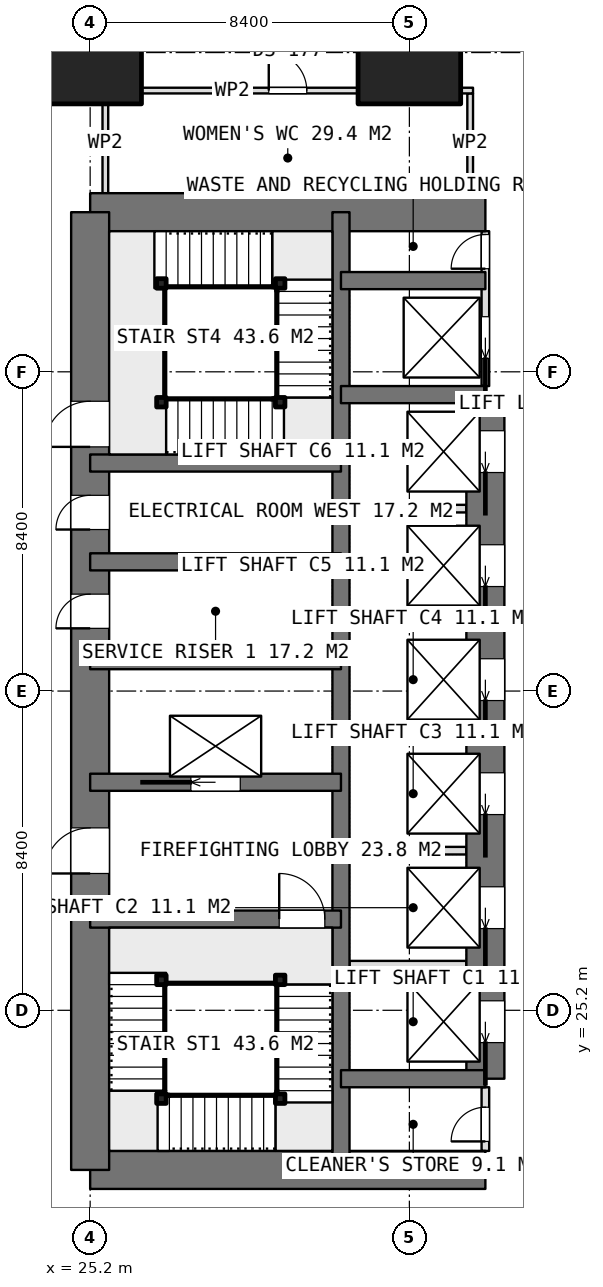
"""IFC4 building model, lengths in metres.
Left out: names, types, materials, properties, quantities, classifications, styles, units other than length and angle.
Written with IfcOpenShell. Run it as: python <this file> out.ifc"""

import sys

from ifc_helpers import new_model, si_unit, direction, frame, frame_2d, origin, origin_2d, place, context, subcontext, project, spatial, rectangle, extrude, element, fill, save


model = new_model("IFC4")
c1 = context("Model", 3, precision=1e-05, world=origin(), true_north=direction((0.0, 1.0)))
c2 = subcontext(c1, "Body", "Model", "MODEL_VIEW")
j1 = project(units=[si_unit("LENGTHUNIT", "METRE"), si_unit("PLANEANGLEUNIT", "RADIAN")], contexts=[c1])
p1 = place(None, origin())
s1 = spatial("IfcSite", under=j1, at=p1, CompositionType="ELEMENT")
p2 = place(p1, origin())
s2 = spatial("IfcBuilding", under=s1, at=p2, CompositionType="ELEMENT")
p3 = place(p2, frame((0.0, 0.0, 168.2)))
s3 = spatial("IfcBuildingStorey", under=s2, at=p3, CompositionType="ELEMENT", Elevation=168.2)
for number, where, z_axis, x_axis in (
    (1, (25.2, 21.0, 0.0), (0.0, 0.0, 1.0), (1.0, 0.0, 0.0)),
    (2, (25.2, 46.2, 0.0), (0.0, 0.0, 1.0), (1.0, 0.0, 0.0)),
):
    element("IfcWall", number, at=place(p3, frame(where, z_axis=z_axis, x_axis=x_axis)), inside=s3, PredefinedType="SHEAR", context=c2, shape_type="SweptSolid", body=[
        extrude(rectangle(XDim=10.4, YDim=1.0, at=frame_2d((5.2, 0.0))), origin(), (0.0, 0.0, 1.0), 4.5),
    ])
p4 = place(p3, frame((25.2, 21.0, 0.0), z_axis=(0.0, 0.0, 1.0), x_axis=(0.0, 1.0, 0.0)))
e3 = element("IfcWall", 3, at=p4, inside=s3, PredefinedType="SHEAR", context=c2, shape_type="SweptSolid", body=[
    extrude(rectangle(XDim=25.2, YDim=1.0, at=frame_2d((12.6, 0.0))), origin(), (0.0, 0.0, 1.0), 4.5),
])
p5 = place(p4, frame((7.8, 0.0, 0.0)))
e4 = element("IfcOpeningElement", 4, at=p5, cuts=e3, PredefinedType="OPENING", context=c2, shape_type="SweptSolid", body=[
    extrude(rectangle(XDim=1.2, YDim=2.1, at=frame_2d((0.6, 1.05))), frame((0.0, 0.51, 0.0), z_axis=(0.0, -1.0, 0.0), x_axis=(1.0, 0.0, 0.0)), (0.0, 0.0, 1.0), 1.02),
])
p6 = place(p4, frame((14.25, 0.0, 0.0)))
e5 = element("IfcOpeningElement", 5, at=p6, cuts=e3, PredefinedType="OPENING", context=c2, shape_type="SweptSolid", body=[
    extrude(rectangle(XDim=0.9, YDim=2.1, at=frame_2d((0.45, 1.05))), frame((0.0, 0.51, 0.0), z_axis=(0.0, -1.0, 0.0), x_axis=(1.0, 0.0, 0.0)), (0.0, 0.0, 1.0), 1.02),
])
p7 = place(p4, frame((16.85, 0.0, 0.0)))
e6 = element("IfcOpeningElement", 6, at=p7, cuts=e3, PredefinedType="OPENING", context=c2, shape_type="SweptSolid", body=[
    extrude(rectangle(XDim=0.9, YDim=2.1, at=frame_2d((0.45, 1.05))), frame((0.0, 0.51, 0.0), z_axis=(0.0, -1.0, 0.0), x_axis=(1.0, 0.0, 0.0)), (0.0, 0.0, 1.0), 1.02),
])
p8 = place(p4, frame((19.025, 0.0, 0.0)))
e7 = element("IfcOpeningElement", 7, at=p8, cuts=e3, PredefinedType="OPENING", context=c2, shape_type="SweptSolid", body=[
    extrude(rectangle(XDim=1.2, YDim=2.1, at=frame_2d((0.6, 1.05))), frame((0.0, 0.51, 0.0), z_axis=(0.0, -1.0, 0.0), x_axis=(1.0, 0.0, 0.0)), (0.0, 0.0, 1.0), 1.02),
])
p9 = place(p3, frame((31.8, 21.0, 0.0), z_axis=(0.0, 0.0, 1.0), x_axis=(0.0, 1.0, 0.0)))
e8 = element("IfcWall", 8, at=p9, inside=s3, PredefinedType="SHEAR", context=c2, shape_type="SweptSolid", body=[
    extrude(rectangle(XDim=25.2, YDim=0.45, at=frame_2d((12.6, 0.0))), origin(), (0.0, 0.0, 1.0), 4.5),
])
p10 = place(p3, frame((35.6, 23.4, 0.0), z_axis=(0.0, 0.0, 1.0), x_axis=(0.0, 1.0, 0.0)))
e9 = element("IfcWall", 9, at=p10, inside=s3, PredefinedType="SHEAR", context=c2, shape_type="SweptSolid", body=[
    extrude(rectangle(XDim=18.0, YDim=1.0, at=frame_2d((9.0, 0.0))), origin(), (0.0, 0.0, 1.0), 4.5),
])
p11 = place(p10, frame((0.95, 0.0, 0.0)))
e10 = element("IfcOpeningElement", 10, at=p11, cuts=e9, PredefinedType="OPENING", context=c2, shape_type="SweptSolid", body=[
    extrude(rectangle(XDim=1.1, YDim=2.1, at=frame_2d((0.55, 1.05))), frame((0.0, 0.51, 0.0), z_axis=(0.0, -1.0, 0.0), x_axis=(1.0, 0.0, 0.0)), (0.0, 0.0, 1.0), 1.02),
])
p12 = place(p10, frame((3.95, 0.0, 0.0)))
e11 = element("IfcOpeningElement", 11, at=p12, cuts=e9, PredefinedType="OPENING", context=c2, shape_type="SweptSolid", body=[
    extrude(rectangle(XDim=1.1, YDim=2.1, at=frame_2d((0.55, 1.05))), frame((0.0, 0.51, 0.0), z_axis=(0.0, -1.0, 0.0), x_axis=(1.0, 0.0, 0.0)), (0.0, 0.0, 1.0), 1.02),
])
p13 = place(p10, frame((6.95, 0.0, 0.0)))
e12 = element("IfcOpeningElement", 12, at=p13, cuts=e9, PredefinedType="OPENING", context=c2, shape_type="SweptSolid", body=[
    extrude(rectangle(XDim=1.1, YDim=2.1, at=frame_2d((0.55, 1.05))), frame((0.0, 0.51, 0.0), z_axis=(0.0, -1.0, 0.0), x_axis=(1.0, 0.0, 0.0)), (0.0, 0.0, 1.0), 1.02),
])
p14 = place(p10, frame((9.95, 0.0, 0.0)))
e13 = element("IfcOpeningElement", 13, at=p14, cuts=e9, PredefinedType="OPENING", context=c2, shape_type="SweptSolid", body=[
    extrude(rectangle(XDim=1.1, YDim=2.1, at=frame_2d((0.55, 1.05))), frame((0.0, 0.51, 0.0), z_axis=(0.0, -1.0, 0.0), x_axis=(1.0, 0.0, 0.0)), (0.0, 0.0, 1.0), 1.02),
])
p15 = place(p10, frame((12.95, 0.0, 0.0)))
e14 = element("IfcOpeningElement", 14, at=p15, cuts=e9, PredefinedType="OPENING", context=c2, shape_type="SweptSolid", body=[
    extrude(rectangle(XDim=1.1, YDim=2.1, at=frame_2d((0.55, 1.05))), frame((0.0, 0.51, 0.0), z_axis=(0.0, -1.0, 0.0), x_axis=(1.0, 0.0, 0.0)), (0.0, 0.0, 1.0), 1.02),
])
p16 = place(p10, frame((15.95, 0.0, 0.0)))
e15 = element("IfcOpeningElement", 15, at=p16, cuts=e9, PredefinedType="OPENING", context=c2, shape_type="SweptSolid", body=[
    extrude(rectangle(XDim=1.1, YDim=2.1, at=frame_2d((0.55, 1.05))), frame((0.0, 0.51, 0.0), z_axis=(0.0, -1.0, 0.0), x_axis=(1.0, 0.0, 0.0)), (0.0, 0.0, 1.0), 1.02),
])
for number, where, z_axis, x_axis in (
    (16, (31.8, 23.4, 0.0), (0.0, 0.0, 1.0), (1.0, 0.0, 0.0)),
    (17, (31.8, 41.4, 0.0), (0.0, 0.0, 1.0), (1.0, 0.0, 0.0)),
    (18, (31.8, 44.4, 0.0), (0.0, 0.0, 1.0), (1.0, 0.0, 0.0)),
):
    element("IfcWall", number, at=place(p3, frame(where, z_axis=z_axis, x_axis=x_axis)), inside=s3, PredefinedType="SHEAR", context=c2, shape_type="SweptSolid", body=[
        extrude(rectangle(XDim=3.8, YDim=0.45, at=frame_2d((1.9, 0.0))), origin(), (0.0, 0.0, 1.0), 4.5),
    ])
p17 = place(p3, frame((25.2, 27.6, 0.0), z_axis=(0.0, 0.0, 1.0), x_axis=(1.0, 0.0, 0.0)))
e19 = element("IfcWall", 19, at=p17, inside=s3, PredefinedType="SHEAR", context=c2, shape_type="SweptSolid", body=[
    extrude(rectangle(XDim=6.6, YDim=0.45, at=frame_2d((3.3, 0.0))), origin(), (0.0, 0.0, 1.0), 4.5),
])
p18 = place(p17, frame((4.975, 0.0, 0.0)))
e20 = element("IfcOpeningElement", 20, at=p18, cuts=e19, PredefinedType="OPENING", context=c2, shape_type="SweptSolid", body=[
    extrude(rectangle(XDim=1.2, YDim=2.1, at=frame_2d((0.6, 1.05))), frame((0.0, 0.235, 0.0), z_axis=(0.0, -1.0, 0.0), x_axis=(1.0, 0.0, 0.0)), (0.0, 0.0, 1.0), 0.47),
])
p19 = place(p3, frame((25.2, 31.2, 0.0), z_axis=(0.0, 0.0, 1.0), x_axis=(1.0, 0.0, 0.0)))
e21 = element("IfcWall", 21, at=p19, inside=s3, PredefinedType="SHEAR", context=c2, shape_type="SweptSolid", body=[
    extrude(rectangle(XDim=6.6, YDim=0.45, at=frame_2d((3.3, 0.0))), origin(), (0.0, 0.0, 1.0), 4.5),
])
p20 = place(p19, frame((2.65, 0.0, 0.0)))
e22 = element("IfcOpeningElement", 22, at=p20, cuts=e21, PredefinedType="OPENING", context=c2, shape_type="SweptSolid", body=[
    extrude(rectangle(XDim=1.3, YDim=2.1, at=frame_2d((0.65, 1.05))), frame((0.0, 0.235, 0.0), z_axis=(0.0, -1.0, 0.0), x_axis=(1.0, 0.0, 0.0)), (0.0, 0.0, 1.0), 0.47),
])
for number, where, z_axis, x_axis in (
    (23, (25.2, 34.4, 0.0), (0.0, 0.0, 1.0), (1.0, 0.0, 0.0)),
    (24, (25.2, 37.0, 0.0), (0.0, 0.0, 1.0), (1.0, 0.0, 0.0)),
    (25, (25.2, 39.6, 0.0), (0.0, 0.0, 1.0), (1.0, 0.0, 0.0)),
):
    element("IfcWall", number, at=place(p3, frame(where, z_axis=z_axis, x_axis=x_axis)), inside=s3, PredefinedType="SHEAR", context=c2, shape_type="SweptSolid", body=[
        extrude(rectangle(XDim=6.6, YDim=0.45, at=frame_2d((3.3, 0.0))), origin(), (0.0, 0.0, 1.0), 4.5),
    ])
for number, where, z_axis, x_axis in (
    (26, (25.2, 50.4, 0.0), (0.0, 0.0, 1.0), (1.0, 0.0, 0.0)),
    (27, (33.6, 50.4, 0.0), (0.0, 0.0, 1.0), (1.0, 0.0, 0.0)),
):
    element("IfcColumn", number, at=place(p3, frame(where, z_axis=z_axis, x_axis=x_axis)), inside=s3, PredefinedType="COLUMN", context=c2, shape_type="SweptSolid", body=[
        extrude(rectangle(XDim=2.7, YDim=2.7, at=origin_2d()), origin(), (0.0, 0.0, 1.0), 4.5),
    ])
for number, where, z_axis, x_axis in (
    (28, (32.025, 26.4, 0.0), (0.0, 0.0, 1.0), (1.0, 0.0, 0.0)),
    (29, (32.025, 29.4, 0.0), (0.0, 0.0, 1.0), (1.0, 0.0, 0.0)),
    (30, (32.025, 32.4, 0.0), (0.0, 0.0, 1.0), (1.0, 0.0, 0.0)),
    (31, (32.025, 35.4, 0.0), (0.0, 0.0, 1.0), (1.0, 0.0, 0.0)),
    (32, (32.025, 38.4, 0.0), (0.0, 0.0, 1.0), (1.0, 0.0, 0.0)),
):
    element("IfcWall", number, at=place(p3, frame(where, z_axis=z_axis, x_axis=x_axis)), inside=s3, PredefinedType="PARTITIONING", context=c2, shape_type="SweptSolid", body=[
        extrude(rectangle(XDim=3.075, YDim=0.2, at=frame_2d((1.538, 0.0))), origin(), (0.0, 0.0, 1.0), 4.25),
    ])
p21 = place(p3, frame((35.6, 41.625, 0.0), z_axis=(0.0, 0.0, 1.0), x_axis=(0.0, 1.0, 0.0)))
e33 = element("IfcWall", 33, at=p21, inside=s3, PredefinedType="PARTITIONING", context=c2, shape_type="SweptSolid", body=[
    extrude(rectangle(XDim=4.075, YDim=0.2, at=frame_2d((2.038, 0.0))), origin(), (0.0, 0.0, 1.0), 4.25),
])
p22 = place(p21, frame((3.088, 0.0, 0.0)))
e34 = element("IfcOpeningElement", 34, at=p22, cuts=e33, PredefinedType="OPENING", context=c2, shape_type="SweptSolid", body=[
    extrude(rectangle(XDim=0.9, YDim=2.1, at=frame_2d((0.45, 1.05))), frame((0.0, 0.11, 0.0), z_axis=(0.0, -1.0, 0.0), x_axis=(1.0, 0.0, 0.0)), (0.0, 0.0, 1.0), 0.22),
])
p23 = place(p21, frame((0.725, 0.0, 0.0)))
e35 = element("IfcOpeningElement", 35, at=p23, cuts=e33, PredefinedType="OPENING", context=c2, shape_type="SweptSolid", body=[
    extrude(rectangle(XDim=1.1, YDim=2.1, at=frame_2d((0.55, 1.05))), frame((0.0, 0.11, 0.0), z_axis=(0.0, -1.0, 0.0), x_axis=(1.0, 0.0, 0.0)), (0.0, 0.0, 1.0), 0.22),
])
p24 = place(p3, frame((35.6, 21.5, 0.0), z_axis=(0.0, 0.0, 1.0), x_axis=(0.0, 1.0, 0.0)))
e36 = element("IfcWall", 36, at=p24, inside=s3, PredefinedType="PARTITIONING", context=c2, shape_type="SweptSolid", body=[
    extrude(rectangle(XDim=1.675, YDim=0.2, at=frame_2d((0.837, 0.0))), origin(), (0.0, 0.0, 1.0), 4.25),
])
p25 = place(p24, frame((0.25, 0.0, 0.0)))
e37 = element("IfcOpeningElement", 37, at=p25, cuts=e36, PredefinedType="OPENING", context=c2, shape_type="SweptSolid", body=[
    extrude(rectangle(XDim=0.9, YDim=2.1, at=frame_2d((0.45, 1.05))), frame((0.0, 0.11, 0.0), z_axis=(0.0, -1.0, 0.0), x_axis=(1.0, 0.0, 0.0)), (0.0, 0.0, 1.0), 0.22),
])
p26 = place(p3, frame((25.525, 49.4, 0.0), z_axis=(0.0, 0.0, 1.0), x_axis=(1.0, 0.0, 0.0)))
e38 = element("IfcWall", 38, at=p26, inside=s3, PredefinedType="PARTITIONING", context=c2, shape_type="SweptSolid", body=[
    extrude(rectangle(XDim=9.75, YDim=0.15, at=frame_2d((4.875, 0.0))), origin(), (0.0, 0.0, 1.0), 4.25),
])
p27 = place(p26, frame((4.375, 0.0, 0.0)))
e39 = element("IfcOpeningElement", 39, at=p27, cuts=e38, PredefinedType="OPENING", context=c2, shape_type="SweptSolid", body=[
    extrude(rectangle(XDim=1.0, YDim=2.1, at=frame_2d((0.5, 1.05))), frame((0.0, 0.085, 0.0), z_axis=(0.0, -1.0, 0.0), x_axis=(1.0, 0.0, 0.0)), (0.0, 0.0, 1.0), 0.17),
])
for number, where, z_axis, x_axis in (
    (40, (25.6, 46.7, 0.0), (0.0, 0.0, 1.0), (0.0, 1.0, 0.0)),
    (41, (35.2, 46.7, 0.0), (0.0, 0.0, 1.0), (0.0, 1.0, 0.0)),
):
    element("IfcWall", number, at=place(p3, frame(where, z_axis=z_axis, x_axis=x_axis)), inside=s3, PredefinedType="PARTITIONING", context=c2, shape_type="SweptSolid", body=[
        extrude(rectangle(XDim=2.625, YDim=0.15, at=frame_2d((1.312, 0.0))), origin(), (0.0, 0.0, 1.0), 4.25),
    ])
for number, where, z_axis, x_axis in (
    (42, (30.2, 26.0, 0.0), (0.0, 0.0, 1.0), (1.0, 0.0, 0.0)),
    (43, (30.2, 22.875, 0.0), (0.0, 0.0, 1.0), (1.0, 0.0, 0.0)),
    (44, (27.075, 22.875, 0.0), (0.0, 0.0, 1.0), (1.0, 0.0, 0.0)),
    (45, (27.075, 26.0, 0.0), (0.0, 0.0, 1.0), (1.0, 0.0, 0.0)),
    (46, (27.075, 41.2, 0.0), (0.0, 0.0, 1.0), (1.0, 0.0, 0.0)),
    (47, (30.2, 41.2, 0.0), (0.0, 0.0, 1.0), (1.0, 0.0, 0.0)),
    (48, (30.2, 44.325, 0.0), (0.0, 0.0, 1.0), (1.0, 0.0, 0.0)),
    (49, (27.075, 44.325, 0.0), (0.0, 0.0, 1.0), (1.0, 0.0, 0.0)),
):
    element("IfcColumn", number, at=place(p3, frame(where, z_axis=z_axis, x_axis=x_axis)), inside=s3, PredefinedType="COLUMN", context=c2, shape_type="SweptSolid", body=[
        extrude(rectangle(XDim=0.25, YDim=0.25, at=origin_2d()), origin(), (0.0, 0.0, 1.0), 4.5),
    ])
p28 = place(p5, origin())
e50 = element("IfcDoor", 50, at=p28, inside=s3, OperationType="SINGLE_SWING_LEFT", PredefinedType="DOOR", context=c2, shape_type="SweptSolid", body=[
    extrude(rectangle(XDim=1.2, YDim=2.1, at=frame_2d((0.6, 1.05))), frame((0.0, 0.025, 0.0), z_axis=(0.0, -1.0, 0.0), x_axis=(1.0, 0.0, 0.0)), (0.0, 0.0, 1.0), 0.05),
])
fill(e4, e50)
p29 = place(p6, origin())
e51 = element("IfcDoor", 51, at=p29, inside=s3, OperationType="SINGLE_SWING_LEFT", PredefinedType="DOOR", context=c2, shape_type="SweptSolid", body=[
    extrude(rectangle(XDim=0.9, YDim=2.1, at=frame_2d((0.45, 1.05))), frame((0.0, 0.025, 0.0), z_axis=(0.0, -1.0, 0.0), x_axis=(1.0, 0.0, 0.0)), (0.0, 0.0, 1.0), 0.05),
])
fill(e5, e51)
p30 = place(p7, origin())
e52 = element("IfcDoor", 52, at=p30, inside=s3, OperationType="SINGLE_SWING_LEFT", PredefinedType="DOOR", context=c2, shape_type="SweptSolid", body=[
    extrude(rectangle(XDim=0.9, YDim=2.1, at=frame_2d((0.45, 1.05))), frame((0.0, 0.025, 0.0), z_axis=(0.0, -1.0, 0.0), x_axis=(1.0, 0.0, 0.0)), (0.0, 0.0, 1.0), 0.05),
])
fill(e6, e52)
p31 = place(p25, origin())
e53 = element("IfcDoor", 53, at=p31, inside=s3, OperationType="SINGLE_SWING_LEFT", PredefinedType="DOOR", context=c2, shape_type="SweptSolid", body=[
    extrude(rectangle(XDim=0.9, YDim=2.1, at=frame_2d((0.45, 1.05))), frame((0.0, 0.025, 0.0), z_axis=(0.0, -1.0, 0.0), x_axis=(1.0, 0.0, 0.0)), (0.0, 0.0, 1.0), 0.05),
])
fill(e37, e53)
p32 = place(p22, origin())
e54 = element("IfcDoor", 54, at=p32, inside=s3, OperationType="SINGLE_SWING_LEFT", PredefinedType="DOOR", context=c2, shape_type="SweptSolid", body=[
    extrude(rectangle(XDim=0.9, YDim=2.1, at=frame_2d((0.45, 1.05))), frame((0.0, 0.025, 0.0), z_axis=(0.0, -1.0, 0.0), x_axis=(1.0, 0.0, 0.0)), (0.0, 0.0, 1.0), 0.05),
])
fill(e34, e54)
p33 = place(p11, origin())
e55 = element("IfcDoor", 55, at=p33, inside=s3, OperationType="SLIDING_TO_LEFT", PredefinedType="USERDEFINED", context=c2, shape_type="SweptSolid", body=[
    extrude(rectangle(XDim=1.1, YDim=2.1, at=frame_2d((0.55, 1.05))), frame((0.0, 0.025, 0.0), z_axis=(0.0, -1.0, 0.0), x_axis=(1.0, 0.0, 0.0)), (0.0, 0.0, 1.0), 0.05),
])
fill(e10, e55)
p34 = place(p12, origin())
e56 = element("IfcDoor", 56, at=p34, inside=s3, OperationType="SLIDING_TO_LEFT", PredefinedType="USERDEFINED", context=c2, shape_type="SweptSolid", body=[
    extrude(rectangle(XDim=1.1, YDim=2.1, at=frame_2d((0.55, 1.05))), frame((0.0, 0.025, 0.0), z_axis=(0.0, -1.0, 0.0), x_axis=(1.0, 0.0, 0.0)), (0.0, 0.0, 1.0), 0.05),
])
fill(e11, e56)
p35 = place(p13, origin())
e57 = element("IfcDoor", 57, at=p35, inside=s3, OperationType="SLIDING_TO_LEFT", PredefinedType="USERDEFINED", context=c2, shape_type="SweptSolid", body=[
    extrude(rectangle(XDim=1.1, YDim=2.1, at=frame_2d((0.55, 1.05))), frame((0.0, 0.025, 0.0), z_axis=(0.0, -1.0, 0.0), x_axis=(1.0, 0.0, 0.0)), (0.0, 0.0, 1.0), 0.05),
])
fill(e12, e57)
p36 = place(p14, origin())
e58 = element("IfcDoor", 58, at=p36, inside=s3, OperationType="SLIDING_TO_LEFT", PredefinedType="USERDEFINED", context=c2, shape_type="SweptSolid", body=[
    extrude(rectangle(XDim=1.1, YDim=2.1, at=frame_2d((0.55, 1.05))), frame((0.0, 0.025, 0.0), z_axis=(0.0, -1.0, 0.0), x_axis=(1.0, 0.0, 0.0)), (0.0, 0.0, 1.0), 0.05),
])
fill(e13, e58)
p37 = place(p15, origin())
e59 = element("IfcDoor", 59, at=p37, inside=s3, OperationType="SLIDING_TO_LEFT", PredefinedType="USERDEFINED", context=c2, shape_type="SweptSolid", body=[
    extrude(rectangle(XDim=1.1, YDim=2.1, at=frame_2d((0.55, 1.05))), frame((0.0, 0.025, 0.0), z_axis=(0.0, -1.0, 0.0), x_axis=(1.0, 0.0, 0.0)), (0.0, 0.0, 1.0), 0.05),
])
fill(e14, e59)
p38 = place(p16, origin())
e60 = element("IfcDoor", 60, at=p38, inside=s3, OperationType="SLIDING_TO_LEFT", PredefinedType="USERDEFINED", context=c2, shape_type="SweptSolid", body=[
    extrude(rectangle(XDim=1.1, YDim=2.1, at=frame_2d((0.55, 1.05))), frame((0.0, 0.025, 0.0), z_axis=(0.0, -1.0, 0.0), x_axis=(1.0, 0.0, 0.0)), (0.0, 0.0, 1.0), 0.05),
])
fill(e15, e60)
p39 = place(p20, origin())
e61 = element("IfcDoor", 61, at=p39, inside=s3, OperationType="SLIDING_TO_LEFT", PredefinedType="USERDEFINED", context=c2, shape_type="SweptSolid", body=[
    extrude(rectangle(XDim=1.3, YDim=2.1, at=frame_2d((0.65, 1.05))), frame((0.0, 0.025, 0.0), z_axis=(0.0, -1.0, 0.0), x_axis=(1.0, 0.0, 0.0)), (0.0, 0.0, 1.0), 0.05),
])
fill(e22, e61)
p40 = place(p23, origin())
e62 = element("IfcDoor", 62, at=p40, inside=s3, OperationType="SLIDING_TO_LEFT", PredefinedType="USERDEFINED", context=c2, shape_type="SweptSolid", body=[
    extrude(rectangle(XDim=1.1, YDim=2.1, at=frame_2d((0.55, 1.05))), frame((0.0, 0.025, 0.0), z_axis=(0.0, -1.0, 0.0), x_axis=(1.0, 0.0, 0.0)), (0.0, 0.0, 1.0), 0.05),
])
fill(e35, e62)
p41 = place(p27, origin())
e63 = element("IfcDoor", 63, at=p41, inside=s3, OperationType="SINGLE_SWING_LEFT", PredefinedType="DOOR", context=c2, shape_type="SweptSolid", body=[
    extrude(rectangle(XDim=1.0, YDim=2.1, at=frame_2d((0.5, 1.05))), frame((0.0, 0.025, 0.0), z_axis=(0.0, -1.0, 0.0), x_axis=(1.0, 0.0, 0.0)), (0.0, 0.0, 1.0), 0.05),
])
fill(e39, e63)
p42 = place(p18, origin())
e64 = element("IfcDoor", 64, at=p42, inside=s3, OperationType="SINGLE_SWING_RIGHT", PredefinedType="DOOR", context=c2, shape_type="SweptSolid", body=[
    extrude(rectangle(XDim=1.2, YDim=2.1, at=frame_2d((0.6, 1.05))), frame((0.0, 0.025, 0.0), z_axis=(0.0, -1.0, 0.0), x_axis=(1.0, 0.0, 0.0)), (0.0, 0.0, 1.0), 0.05),
])
fill(e20, e64)
p43 = place(p8, origin())
e65 = element("IfcDoor", 65, at=p43, inside=s3, OperationType="SINGLE_SWING_RIGHT", PredefinedType="DOOR", context=c2, shape_type="SweptSolid", body=[
    extrude(rectangle(XDim=1.2, YDim=2.1, at=frame_2d((0.6, 1.05))), frame((0.0, 0.025, 0.0), z_axis=(0.0, -1.0, 0.0), x_axis=(1.0, 0.0, 0.0)), (0.0, 0.0, 1.0), 0.05),
])
fill(e7, e65)
save(model, sys.argv[1])
